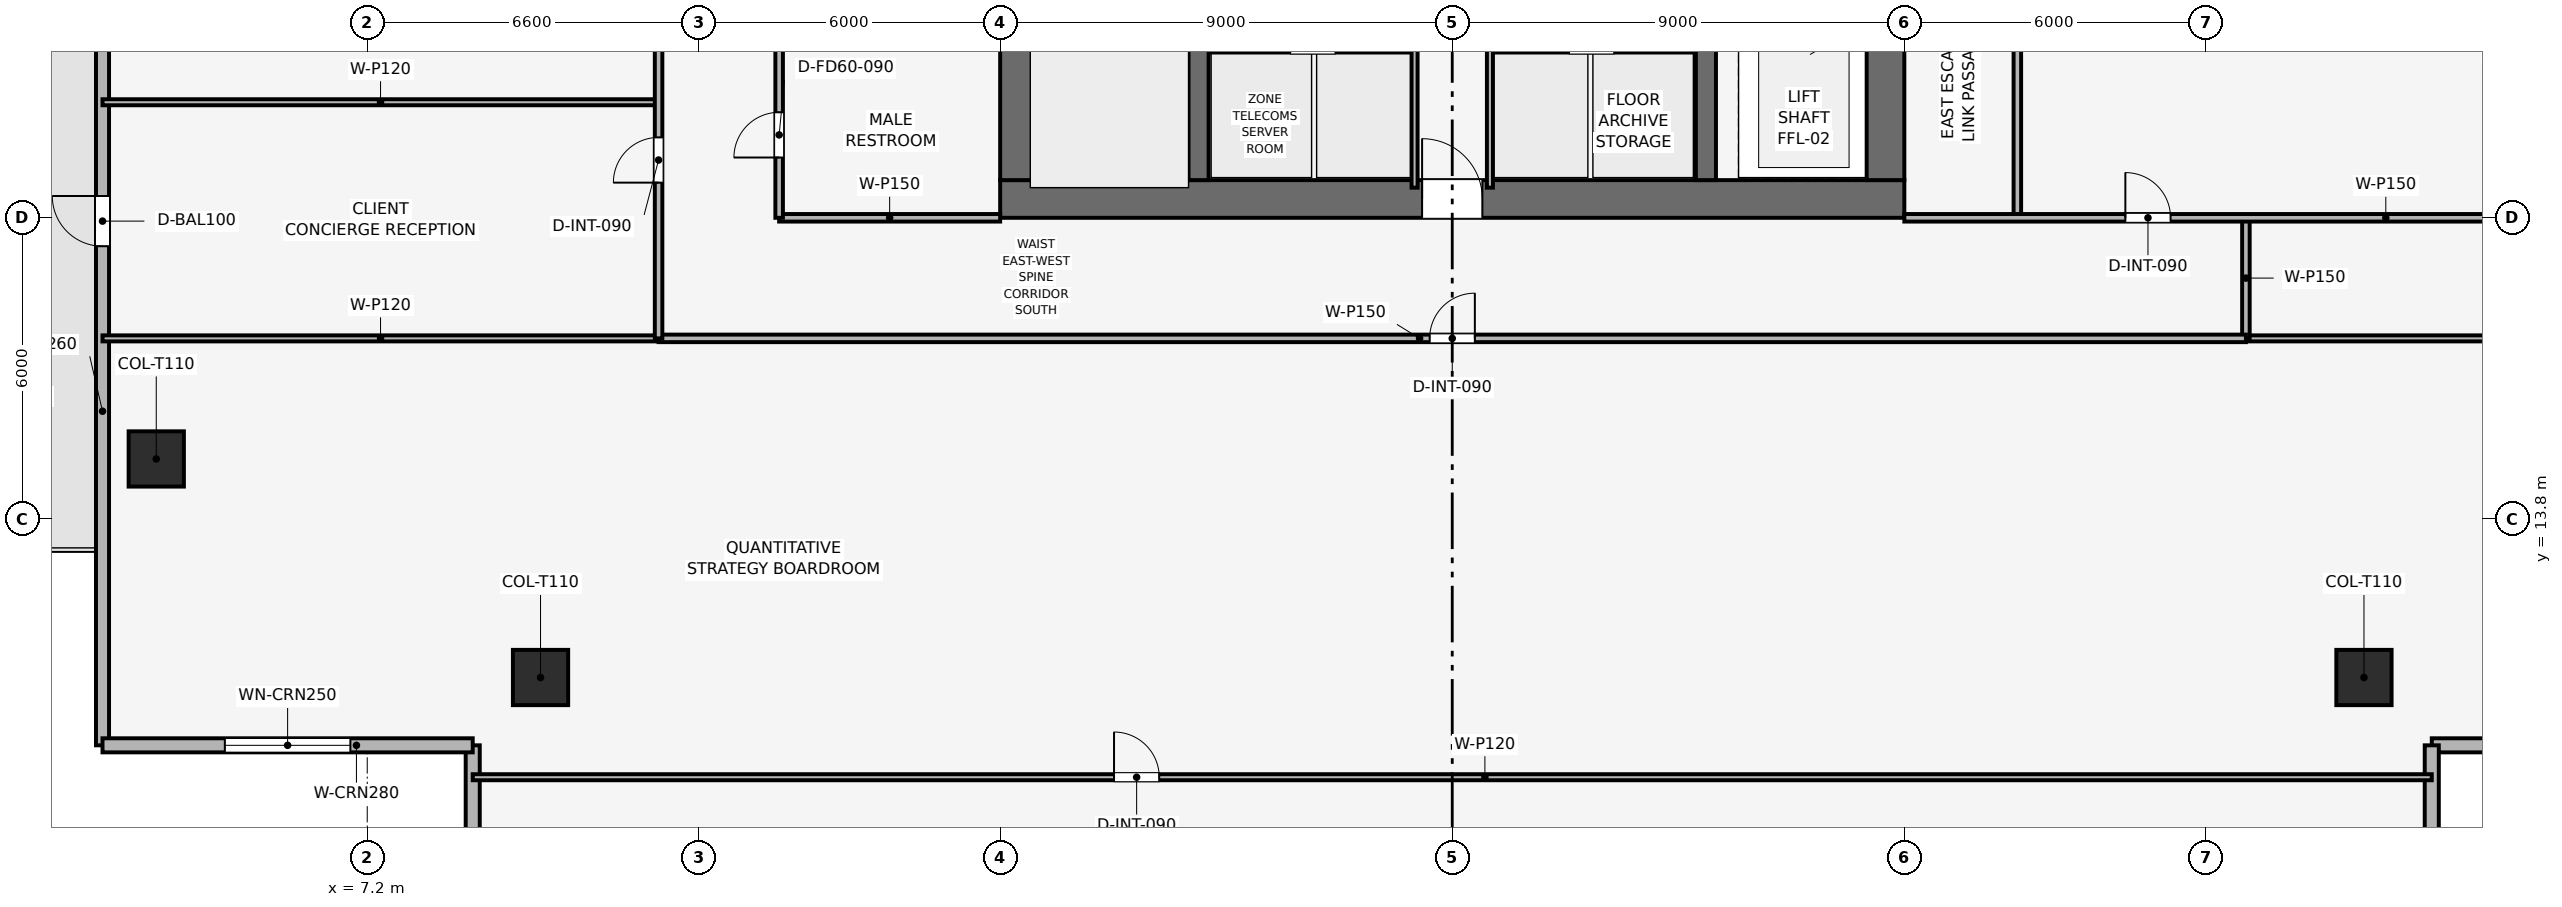
"""IFC4 building model, lengths in metres.
Left out: names, types, materials, properties, quantities, classifications, styles, units other than length and angle.
Written with IfcOpenShell. Run it as: python <this file> out.ifc"""

import sys

from ifc_helpers import new_model, si_unit, direction, frame, frame_2d, origin, origin_2d, place, context, subcontext, project, spatial, rectangle, extrude, element, fill, save


model = new_model("IFC4")
c1 = context("Model", 3, precision=1e-05, world=origin(), true_north=direction((0.0, 1.0)))
c2 = subcontext(c1, "Body", "Model", "MODEL_VIEW")
j1 = project(units=[si_unit("LENGTHUNIT", "METRE"), si_unit("PLANEANGLEUNIT", "RADIAN")], contexts=[c1])
p1 = place(None, origin())
s1 = spatial("IfcSite", under=j1, at=p1, CompositionType="ELEMENT")
p2 = place(p1, origin())
s2 = spatial("IfcBuilding", under=s1, at=p2, CompositionType="ELEMENT")
p3 = place(p2, frame((0.0, 0.0, 237.45)))
s3 = spatial("IfcBuildingStorey", under=s2, at=p3, CompositionType="ELEMENT", Elevation=237.45)
p4 = place(p3, frame((19.8, 20.175, 0.0), z_axis=(0.0, 0.0, 1.0), x_axis=(1.0, 0.0, 0.0)))
e1 = element("IfcWall", 1, at=p4, inside=s3, PredefinedType="SHEAR", context=c2, shape_type="SweptSolid", body=[
    extrude(rectangle(XDim=18.0, YDim=0.75, at=frame_2d((9.0, 0.0))), origin(), (0.0, 0.0, 1.0), 3.75),
])
p5 = place(p4, frame((8.4, 0.0, 0.0)))
e2 = element("IfcOpeningElement", 2, at=p5, cuts=e1, PredefinedType="OPENING", context=c2, shape_type="SweptSolid", body=[
    extrude(rectangle(XDim=1.2, YDim=2.2, at=frame_2d((0.6, 1.1))), frame((0.0, 0.385, 0.0), z_axis=(0.0, -1.0, 0.0), x_axis=(1.0, 0.0, 0.0)), (0.0, 0.0, 1.0), 0.77),
])
p6 = place(p3, frame((20.175, 20.55, 0.0), z_axis=(0.0, 0.0, 1.0), x_axis=(0.0, 1.0, 0.0)))
e3 = element("IfcWall", 3, at=p6, inside=s3, PredefinedType="SHEAR", context=c2, shape_type="SweptSolid", body=[
    extrude(rectangle(XDim=16.5, YDim=0.75, at=frame_2d((8.25, 0.0))), origin(), (0.0, 0.0, 1.0), 3.75),
])
p7 = place(p6, frame((10.25, 0.0, 0.0)))
e4 = element("IfcOpeningElement", 4, at=p7, cuts=e3, PredefinedType="OPENING", context=c2, shape_type="SweptSolid", body=[
    extrude(rectangle(XDim=1.1, YDim=2.15, at=frame_2d((0.55, 1.075))), frame((0.0, 0.385, 0.0), z_axis=(0.0, -1.0, 0.0), x_axis=(1.0, 0.0, 0.0)), (0.0, 0.0, 1.0), 0.77),
])
p8 = place(p3, frame((37.425, 20.55, 0.0), z_axis=(0.0, 0.0, 1.0), x_axis=(0.0, 1.0, 0.0)))
e5 = element("IfcWall", 5, at=p8, inside=s3, PredefinedType="SHEAR", context=c2, shape_type="SweptSolid", body=[
    extrude(rectangle(XDim=16.5, YDim=0.75, at=frame_2d((8.25, 0.0))), origin(), (0.0, 0.0, 1.0), 3.75),
])
p9 = place(p8, frame((4.75, 0.0, 0.0)))
e6 = element("IfcOpeningElement", 6, at=p9, cuts=e5, PredefinedType="OPENING", context=c2, shape_type="SweptSolid", body=[
    extrude(rectangle(XDim=1.1, YDim=2.15, at=frame_2d((0.55, 1.075))), frame((0.0, 0.385, 0.0), z_axis=(0.0, -1.0, 0.0), x_axis=(1.0, 0.0, 0.0)), (0.0, 0.0, 1.0), 0.77),
])
for number, where, z_axis, x_axis in (
    (7, (23.75, 20.55, 0.0), (0.0, 0.0, 1.0), (0.0, 1.0, 0.0)),
    (8, (33.85, 20.55, 0.0), (0.0, 0.0, 1.0), (0.0, 1.0, 0.0)),
):
    element("IfcWall", number, at=place(p3, frame(where, z_axis=z_axis, x_axis=x_axis)), inside=s3, PredefinedType="SHEAR", context=c2, shape_type="SweptSolid", body=[
        extrude(rectangle(XDim=16.5, YDim=0.4, at=frame_2d((8.25, 0.0))), origin(), (0.0, 0.0, 1.0), 3.75),
    ])
for number, where, z_axis, x_axis in (
    (9, (3.0, 15.0, 0.003), (0.0, 0.0, 1.0), (1.0, 0.0, 0.0)),
    (10, (10.65, 10.65, 0.003), (0.0, 0.0, 1.0), (1.0, 0.0, 0.0)),
    (11, (46.95, 10.65, 0.003), (0.0, 0.0, 1.0), (1.0, 0.0, 0.0)),
):
    element("IfcColumn", number, at=place(p3, frame(where, z_axis=z_axis, x_axis=x_axis)), inside=s3, PredefinedType="COLUMN", context=c2, shape_type="SweptSolid", body=[
        extrude(rectangle(XDim=1.1, YDim=1.1, at=origin_2d()), origin(), (0.0, 0.0, 1.0), 3.494),
    ])
p10 = place(p3, frame((1.93, 9.3, 0.0), z_axis=(0.0, 0.0, 1.0), x_axis=(0.0, 1.0, 0.0)))
e12 = element("IfcWall", 12, at=p10, inside=s3, PredefinedType="SOLIDWALL", context=c2, shape_type="SweptSolid", body=[
    extrude(rectangle(XDim=14.7, YDim=0.26, at=frame_2d((7.35, 0.0))), origin(), (0.0, 0.0, 1.0), 3.5),
])
p11 = place(p10, frame((9.934, 0.0, 0.0)))
e13 = element("IfcOpeningElement", 13, at=p11, cuts=e12, PredefinedType="OPENING", context=c2, shape_type="SweptSolid", body=[
    extrude(rectangle(XDim=1.0, YDim=2.2, at=frame_2d((0.5, 1.1))), frame((0.0, 0.14, 0.0), z_axis=(0.0, -1.0, 0.0), x_axis=(1.0, 0.0, 0.0)), (0.0, 0.0, 1.0), 0.28),
])
p12 = place(p3, frame((9.3, 1.93, 0.0), z_axis=(0.0, 0.0, 1.0), x_axis=(0.0, 1.0, 0.0)))
e14 = element("IfcWall", 14, at=p12, inside=s3, PredefinedType="SOLIDWALL", context=c2, shape_type="SweptSolid", body=[
    extrude(rectangle(XDim=7.37, YDim=0.28, at=frame_2d((3.685, 0.0))), origin(), (0.0, 0.0, 1.0), 3.5),
])
p13 = place(p12, frame((2.435, 0.0, 0.72)))
e15 = element("IfcOpeningElement", 15, at=p13, cuts=e14, PredefinedType="OPENING", context=c2, shape_type="SweptSolid", body=[
    extrude(rectangle(XDim=2.5, YDim=1.9, at=frame_2d((1.25, 0.95))), frame((0.0, 0.15, 0.0), z_axis=(0.0, -1.0, 0.0), x_axis=(1.0, 0.0, 0.0)), (0.0, 0.0, 1.0), 0.3),
])
p14 = place(p3, frame((9.3, 9.3, 0.0), z_axis=(0.0, 0.0, 1.0), x_axis=(-1.0, 0.0, 0.0)))
e16 = element("IfcWall", 16, at=p14, inside=s3, PredefinedType="SOLIDWALL", context=c2, shape_type="SweptSolid", body=[
    extrude(rectangle(XDim=7.37, YDim=0.28, at=frame_2d((3.685, 0.0))), origin(), (0.0, 0.0, 1.0), 3.5),
])
p15 = place(p14, frame((2.435, 0.0, 0.72)))
e17 = element("IfcOpeningElement", 17, at=p15, cuts=e16, PredefinedType="OPENING", context=c2, shape_type="SweptSolid", body=[
    extrude(rectangle(XDim=2.5, YDim=1.9, at=frame_2d((1.25, 0.95))), frame((0.0, 0.15, 0.0), z_axis=(0.0, -1.0, 0.0), x_axis=(1.0, 0.0, 0.0)), (0.0, 0.0, 1.0), 0.3),
])
p16 = place(p3, frame((55.67, 9.3, 0.0), z_axis=(0.0, 0.0, 1.0), x_axis=(-1.0, 0.0, 0.0)))
e18 = element("IfcWall", 18, at=p16, inside=s3, PredefinedType="SOLIDWALL", context=c2, shape_type="SweptSolid", body=[
    extrude(rectangle(XDim=7.37, YDim=0.28, at=frame_2d((3.685, 0.0))), origin(), (0.0, 0.0, 1.0), 3.5),
])
p17 = place(p16, frame((2.435, 0.0, 0.72)))
e19 = element("IfcOpeningElement", 19, at=p17, cuts=e18, PredefinedType="OPENING", context=c2, shape_type="SweptSolid", body=[
    extrude(rectangle(XDim=2.5, YDim=1.9, at=frame_2d((1.25, 0.95))), frame((0.0, 0.15, 0.0), z_axis=(0.0, -1.0, 0.0), x_axis=(1.0, 0.0, 0.0)), (0.0, 0.0, 1.0), 0.3),
])
p18 = place(p3, frame((48.3, 9.3, 0.0), z_axis=(0.0, 0.0, 1.0), x_axis=(0.0, -1.0, 0.0)))
e20 = element("IfcWall", 20, at=p18, inside=s3, PredefinedType="SOLIDWALL", context=c2, shape_type="SweptSolid", body=[
    extrude(rectangle(XDim=7.37, YDim=0.28, at=frame_2d((3.685, 0.0))), origin(), (0.0, 0.0, 1.0), 3.5),
])
p19 = place(p18, frame((2.435, 0.0, 0.72)))
e21 = element("IfcOpeningElement", 21, at=p19, cuts=e20, PredefinedType="OPENING", context=c2, shape_type="SweptSolid", body=[
    extrude(rectangle(XDim=2.5, YDim=1.9, at=frame_2d((1.25, 0.95))), frame((0.0, 0.15, 0.0), z_axis=(0.0, -1.0, 0.0), x_axis=(1.0, 0.0, 0.0)), (0.0, 0.0, 1.0), 0.3),
])
p20 = place(p3, frame((24.0, 23.15, 0.0), z_axis=(0.0, 0.0, 1.0), x_axis=(1.0, 0.0, 0.0)))
e22 = element("IfcWall", 22, at=p20, inside=s3, PredefinedType="PARTITIONING", context=c2, shape_type="SweptSolid", body=[
    extrude(rectangle(XDim=4.05, YDim=0.12, at=frame_2d((2.025, 0.0))), origin(), (0.0, 0.0, 1.0), 3.5),
])
p21 = place(p20, frame((1.575, 0.0, 0.0)))
e23 = element("IfcOpeningElement", 23, at=p21, cuts=e22, PredefinedType="OPENING", context=c2, shape_type="SweptSolid", body=[
    extrude(rectangle(XDim=0.9, YDim=2.1, at=frame_2d((0.45, 1.05))), frame((0.0, 0.07, 0.0), z_axis=(0.0, -1.0, 0.0), x_axis=(1.0, 0.0, 0.0)), (0.0, 0.0, 1.0), 0.14),
])
p22 = place(p3, frame((28.05, 20.4, 0.0), z_axis=(0.0, 0.0, 1.0), x_axis=(0.0, 1.0, 0.0)))
e24 = element("IfcWall", 24, at=p22, inside=s3, PredefinedType="PARTITIONING", context=c2, shape_type="SweptSolid", body=[
    extrude(rectangle(XDim=2.75, YDim=0.12, at=frame_2d((1.375, 0.0))), origin(), (0.0, 0.0, 1.0), 3.5),
])
p23 = place(p3, frame((29.55, 23.15, 0.0), z_axis=(0.0, 0.0, 1.0), x_axis=(1.0, 0.0, 0.0)))
e25 = element("IfcWall", 25, at=p23, inside=s3, PredefinedType="PARTITIONING", context=c2, shape_type="SweptSolid", body=[
    extrude(rectangle(XDim=4.05, YDim=0.12, at=frame_2d((2.025, 0.0))), origin(), (0.0, 0.0, 1.0), 3.5),
])
p24 = place(p23, frame((1.575, 0.0, 0.0)))
e26 = element("IfcOpeningElement", 26, at=p24, cuts=e25, PredefinedType="OPENING", context=c2, shape_type="SweptSolid", body=[
    extrude(rectangle(XDim=0.9, YDim=2.1, at=frame_2d((0.45, 1.05))), frame((0.0, 0.07, 0.0), z_axis=(0.0, -1.0, 0.0), x_axis=(1.0, 0.0, 0.0)), (0.0, 0.0, 1.0), 0.14),
])
p25 = place(p3, frame((29.55, 20.4, 0.0), z_axis=(0.0, 0.0, 1.0), x_axis=(0.0, 1.0, 0.0)))
e27 = element("IfcWall", 27, at=p25, inside=s3, PredefinedType="PARTITIONING", context=c2, shape_type="SweptSolid", body=[
    extrude(rectangle(XDim=2.75, YDim=0.12, at=frame_2d((1.375, 0.0))), origin(), (0.0, 0.0, 1.0), 3.5),
])
p26 = place(p3, frame((15.4, 19.8, 0.0), z_axis=(0.0, 0.0, 1.0), x_axis=(1.0, 0.0, 0.0)))
e28 = element("IfcWall", 28, at=p26, inside=s3, PredefinedType="PARTITIONING", context=c2, shape_type="SweptSolid", body=[
    extrude(rectangle(XDim=4.4, YDim=0.15, at=frame_2d((2.2, 0.0))), origin(), (0.0, 0.0, 1.0), 3.035),
])
p27 = place(p3, frame((15.4, 19.8, 0.0), z_axis=(0.0, 0.0, 1.0), x_axis=(0.0, 1.0, 0.0)))
e29 = element("IfcWall", 29, at=p27, inside=s3, PredefinedType="PARTITIONING", context=c2, shape_type="SweptSolid", body=[
    extrude(rectangle(XDim=10.35, YDim=0.15, at=frame_2d((5.175, 0.0))), origin(), (0.0, 0.0, 1.0), 3.035),
])
p28 = place(p27, frame((1.2, 0.0, 0.0)))
e30 = element("IfcOpeningElement", 30, at=p28, cuts=e29, PredefinedType="OPENING", context=c2, shape_type="SweptSolid", body=[
    extrude(rectangle(XDim=0.9, YDim=2.1, at=frame_2d((0.45, 1.05))), frame((0.0, 0.085, 0.0), z_axis=(0.0, -1.0, 0.0), x_axis=(1.0, 0.0, 0.0)), (0.0, 0.0, 1.0), 0.17),
])
p29 = place(p27, frame((4.7, 0.0, 0.0)))
e31 = element("IfcOpeningElement", 31, at=p29, cuts=e29, PredefinedType="OPENING", context=c2, shape_type="SweptSolid", body=[
    extrude(rectangle(XDim=0.9, YDim=2.1, at=frame_2d((0.45, 1.05))), frame((0.0, 0.085, 0.0), z_axis=(0.0, -1.0, 0.0), x_axis=(1.0, 0.0, 0.0)), (0.0, 0.0, 1.0), 0.17),
])
p30 = place(p27, frame((8.1, 0.0, 0.0)))
e32 = element("IfcOpeningElement", 32, at=p30, cuts=e29, PredefinedType="OPENING", context=c2, shape_type="SweptSolid", body=[
    extrude(rectangle(XDim=0.95, YDim=2.1, at=frame_2d((0.475, 1.05))), frame((0.0, 0.085, 0.0), z_axis=(0.0, -1.0, 0.0), x_axis=(1.0, 0.0, 0.0)), (0.0, 0.0, 1.0), 0.17),
])
p31 = place(p3, frame((40.05, 19.8, 0.0), z_axis=(0.0, 0.0, 1.0), x_axis=(0.0, 1.0, 0.0)))
e33 = element("IfcWall", 33, at=p31, inside=s3, PredefinedType="PARTITIONING", context=c2, shape_type="SweptSolid", body=[
    extrude(rectangle(XDim=7.05, YDim=0.15, at=frame_2d((3.525, 0.0))), origin(), (0.0, 0.0, 1.0), 3.035),
])
p32 = place(p3, frame((9.3, 8.665, 0.0), z_axis=(0.0, 0.0, 1.0), x_axis=(1.0, 0.0, 0.0)))
e34 = element("IfcWall", 34, at=p32, inside=s3, PredefinedType="PARTITIONING", context=c2, shape_type="SweptSolid", body=[
    extrude(rectangle(XDim=39.0, YDim=0.12, at=frame_2d((19.5, 0.0))), origin(), (0.0, 0.0, 1.0), 2.685),
])
p33 = place(p32, frame((12.767, 0.0, 0.0)))
e35 = element("IfcOpeningElement", 35, at=p33, cuts=e34, PredefinedType="OPENING", context=c2, shape_type="SweptSolid", body=[
    extrude(rectangle(XDim=0.9, YDim=2.1, at=frame_2d((0.45, 1.05))), frame((0.0, 0.07, 0.0), z_axis=(0.0, -1.0, 0.0), x_axis=(1.0, 0.0, 0.0)), (0.0, 0.0, 1.0), 0.14),
])
for number, where, z_axis, x_axis in (
    (36, (1.93, 22.1, 0.0), (0.0, 0.0, 1.0), (1.0, 0.0, 0.0)),
    (37, (1.93, 17.4, 0.0), (0.0, 0.0, 1.0), (1.0, 0.0, 0.0)),
):
    element("IfcWall", number, at=place(p3, frame(where, z_axis=z_axis, x_axis=x_axis)), inside=s3, PredefinedType="PARTITIONING", context=c2, shape_type="SweptSolid", body=[
        extrude(rectangle(XDim=11.07, YDim=0.12, at=frame_2d((5.535, 0.0))), origin(), (0.0, 0.0, 1.0), 2.685),
    ])
p34 = place(p3, frame((44.6, 17.4, 0.0), z_axis=(0.0, 0.0, 1.0), x_axis=(1.0, 0.0, 0.0)))
e38 = element("IfcWall", 38, at=p34, inside=s3, PredefinedType="PARTITIONING", context=c2, shape_type="SweptSolid", body=[
    extrude(rectangle(XDim=11.07, YDim=0.12, at=frame_2d((5.535, 0.0))), origin(), (0.0, 0.0, 1.0), 2.685),
])
p35 = place(p3, frame((44.6, 17.4, 0.0), z_axis=(0.0, 0.0, 1.0), x_axis=(0.0, 1.0, 0.0)))
e39 = element("IfcWall", 39, at=p35, inside=s3, PredefinedType="PARTITIONING", context=c2, shape_type="SweptSolid", body=[
    extrude(rectangle(XDim=2.4, YDim=0.15, at=frame_2d((1.2, 0.0))), origin(), (0.0, 0.0, 1.0), 3.5),
])
p36 = place(p3, frame((37.8, 19.8, 0.0), z_axis=(0.0, 0.0, 1.0), x_axis=(1.0, 0.0, 0.0)))
e40 = element("IfcWall", 40, at=p36, inside=s3, PredefinedType="PARTITIONING", context=c2, shape_type="SweptSolid", body=[
    extrude(rectangle(XDim=17.87, YDim=0.15, at=frame_2d((8.935, 0.0))), origin(), (0.0, 0.0, 1.0), 2.685),
])
p37 = place(p36, frame((4.4, 0.0, 0.0)))
e41 = element("IfcOpeningElement", 41, at=p37, cuts=e40, PredefinedType="OPENING", context=c2, shape_type="SweptSolid", body=[
    extrude(rectangle(XDim=0.9, YDim=2.1, at=frame_2d((0.45, 1.05))), frame((0.0, 0.085, 0.0), z_axis=(0.0, -1.0, 0.0), x_axis=(1.0, 0.0, 0.0)), (0.0, 0.0, 1.0), 0.17),
])
p38 = place(p3, frame((13.0, 17.4, 0.0), z_axis=(0.0, 0.0, 1.0), x_axis=(1.0, 0.0, 0.0)))
e42 = element("IfcWall", 42, at=p38, inside=s3, PredefinedType="PARTITIONING", context=c2, shape_type="SweptSolid", body=[
    extrude(rectangle(XDim=31.6, YDim=0.15, at=frame_2d((15.8, 0.0))), origin(), (0.0, 0.0, 1.0), 3.035),
])
p39 = place(p38, frame((15.35, 0.0, 0.0)))
e43 = element("IfcOpeningElement", 43, at=p39, cuts=e42, PredefinedType="OPENING", context=c2, shape_type="SweptSolid", body=[
    extrude(rectangle(XDim=0.9, YDim=2.1, at=frame_2d((0.45, 1.05))), frame((0.0, 0.085, 0.0), z_axis=(0.0, -1.0, 0.0), x_axis=(1.0, 0.0, 0.0)), (0.0, 0.0, 1.0), 0.17),
])
p40 = place(p3, frame((13.0, 17.4, 0.0), z_axis=(0.0, 0.0, 1.0), x_axis=(0.0, 1.0, 0.0)))
e44 = element("IfcWall", 44, at=p40, inside=s3, PredefinedType="PARTITIONING", context=c2, shape_type="SweptSolid", body=[
    extrude(rectangle(XDim=22.8, YDim=0.15, at=frame_2d((11.4, 0.0))), origin(), (0.0, 0.0, 1.0), 3.035),
])
p41 = place(p40, frame((3.1, 0.0, 0.0)))
e45 = element("IfcOpeningElement", 45, at=p41, cuts=e44, PredefinedType="OPENING", context=c2, shape_type="SweptSolid", body=[
    extrude(rectangle(XDim=0.9, YDim=2.1, at=frame_2d((0.45, 1.05))), frame((0.0, 0.085, 0.0), z_axis=(0.0, -1.0, 0.0), x_axis=(1.0, 0.0, 0.0)), (0.0, 0.0, 1.0), 0.17),
])
p42 = place(p40, frame((7.685, 0.0, 0.0)))
e46 = element("IfcOpeningElement", 46, at=p42, cuts=e44, PredefinedType="OPENING", context=c2, shape_type="SweptSolid", body=[
    extrude(rectangle(XDim=0.9, YDim=2.1, at=frame_2d((0.45, 1.05))), frame((0.0, 0.085, 0.0), z_axis=(0.0, -1.0, 0.0), x_axis=(1.0, 0.0, 0.0)), (0.0, 0.0, 1.0), 0.17),
])
p43 = place(p40, frame((15.535, 0.0, 0.0)))
e47 = element("IfcOpeningElement", 47, at=p43, cuts=e44, PredefinedType="OPENING", context=c2, shape_type="SweptSolid", body=[
    extrude(rectangle(XDim=0.9, YDim=2.1, at=frame_2d((0.45, 1.05))), frame((0.0, 0.085, 0.0), z_axis=(0.0, -1.0, 0.0), x_axis=(1.0, 0.0, 0.0)), (0.0, 0.0, 1.0), 0.17),
])
p44 = place(p11, origin())
e48 = element("IfcDoor", 48, at=p44, inside=s3, OperationType="SINGLE_SWING_RIGHT", PredefinedType="DOOR", context=c2, shape_type="SweptSolid", body=[
    extrude(rectangle(XDim=1.0, YDim=2.2, at=frame_2d((0.5, 1.1))), frame((0.0, 0.025, 0.0), z_axis=(0.0, -1.0, 0.0), x_axis=(1.0, 0.0, 0.0)), (0.0, 0.0, 1.0), 0.05),
])
fill(e13, e48)
p45 = place(p15, origin())
e49 = element("IfcWindow", 49, at=p45, inside=s3, PartitioningType="SINGLE_PANEL", PredefinedType="WINDOW", context=c2, shape_type="SweptSolid", body=[
    extrude(rectangle(XDim=2.5, YDim=1.9, at=frame_2d((1.25, 0.95))), frame((0.0, 0.03, 0.0), z_axis=(0.0, -1.0, 0.0), x_axis=(1.0, 0.0, 0.0)), (0.0, 0.0, 1.0), 0.06),
])
fill(e17, e49)
p46 = place(p28, origin())
e50 = element("IfcDoor", 50, at=p46, inside=s3, OperationType="SINGLE_SWING_LEFT", PredefinedType="DOOR", context=c2, shape_type="SweptSolid", body=[
    extrude(rectangle(XDim=0.9, YDim=2.1, at=frame_2d((0.45, 1.05))), frame((0.0, 0.025, 0.0), z_axis=(0.0, -1.0, 0.0), x_axis=(1.0, 0.0, 0.0)), (0.0, 0.0, 1.0), 0.05),
])
fill(e30, e50)
p47 = place(p33, origin())
e51 = element("IfcDoor", 51, at=p47, inside=s3, OperationType="SINGLE_SWING_LEFT", PredefinedType="DOOR", context=c2, shape_type="SweptSolid", body=[
    extrude(rectangle(XDim=0.9, YDim=2.1, at=frame_2d((0.45, 1.05))), frame((0.0, 0.025, 0.0), z_axis=(0.0, -1.0, 0.0), x_axis=(1.0, 0.0, 0.0)), (0.0, 0.0, 1.0), 0.05),
])
fill(e35, e51)
p48 = place(p37, origin())
e52 = element("IfcDoor", 52, at=p48, inside=s3, OperationType="SINGLE_SWING_LEFT", PredefinedType="DOOR", context=c2, shape_type="SweptSolid", body=[
    extrude(rectangle(XDim=0.9, YDim=2.1, at=frame_2d((0.45, 1.05))), frame((0.0, 0.025, 0.0), z_axis=(0.0, -1.0, 0.0), x_axis=(1.0, 0.0, 0.0)), (0.0, 0.0, 1.0), 0.05),
])
fill(e41, e52)
p49 = place(p39, origin())
e53 = element("IfcDoor", 53, at=p49, inside=s3, OperationType="SINGLE_SWING_RIGHT", PredefinedType="DOOR", context=c2, shape_type="SweptSolid", body=[
    extrude(rectangle(XDim=0.9, YDim=2.1, at=frame_2d((0.45, 1.05))), frame((0.0, 0.025, 0.0), z_axis=(0.0, -1.0, 0.0), x_axis=(1.0, 0.0, 0.0)), (0.0, 0.0, 1.0), 0.05),
])
fill(e43, e53)
p50 = place(p41, origin())
e54 = element("IfcDoor", 54, at=p50, inside=s3, OperationType="SINGLE_SWING_LEFT", PredefinedType="DOOR", context=c2, shape_type="SweptSolid", body=[
    extrude(rectangle(XDim=0.9, YDim=2.1, at=frame_2d((0.45, 1.05))), frame((0.0, 0.025, 0.0), z_axis=(0.0, -1.0, 0.0), x_axis=(1.0, 0.0, 0.0)), (0.0, 0.0, 1.0), 0.05),
])
fill(e45, e54)
p51 = place(p5, origin())
e55 = element("IfcDoor", 55, at=p51, inside=s3, OperationType="SINGLE_SWING_LEFT", PredefinedType="DOOR", context=c2, shape_type="SweptSolid", body=[
    extrude(rectangle(XDim=1.2, YDim=2.2, at=frame_2d((0.6, 1.1))), frame((0.0, 0.025, 0.0), z_axis=(0.0, -1.0, 0.0), x_axis=(1.0, 0.0, 0.0)), (0.0, 0.0, 1.0), 0.05),
])
fill(e2, e55)
save(model, sys.argv[1])
